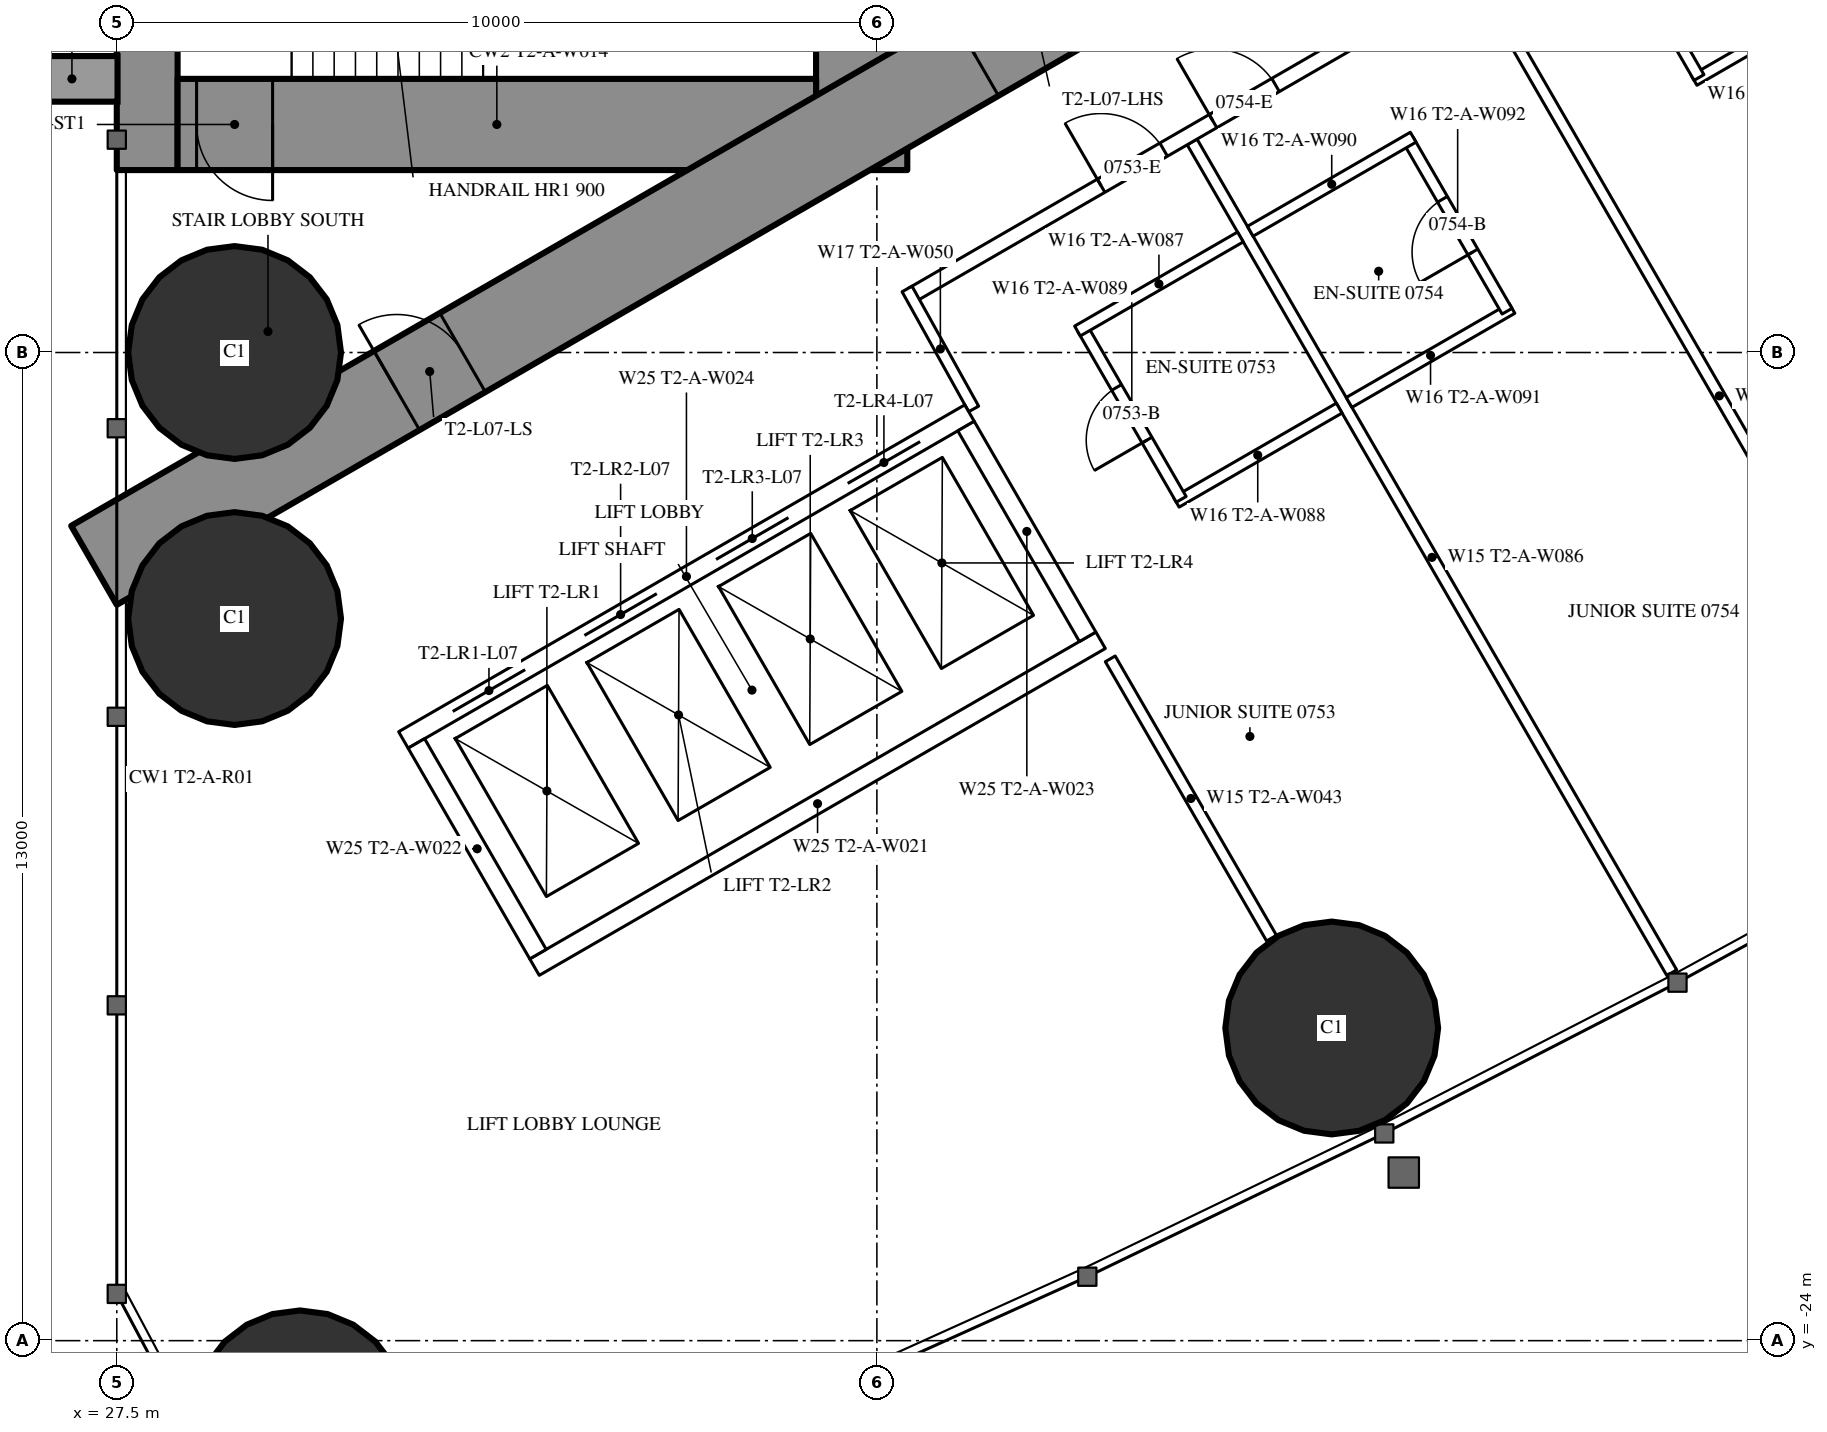
"""IFC4 building model, lengths in metres.
Left out: names, types, materials, properties, quantities, classifications, styles, units other than length and angle.
Written with IfcOpenShell. Run it as: python <this file> out.ifc"""

import sys

from ifc_helpers import new_model, si_unit, direction, frame, frame_2d, origin, origin_2d, place, context, subcontext, project, spatial, rectangle, hollow_circle, extrude, element, fill, save


model = new_model("IFC4")
c1 = context("Model", 3, precision=1e-05, world=origin(), true_north=direction((0.0, 1.0)))
c2 = subcontext(c1, "Body", "Model", "MODEL_VIEW")
j1 = project(units=[si_unit("LENGTHUNIT", "METRE"), si_unit("PLANEANGLEUNIT", "RADIAN")], contexts=[c1])
p1 = place(None, origin())
s1 = spatial("IfcSite", under=j1, at=p1, CompositionType="ELEMENT")
p2 = place(p1, origin())
s2 = spatial("IfcBuilding", under=s1, at=p2, CompositionType="ELEMENT")
p3 = place(p2, frame((0.0, 0.0, 32.0)))
s3 = spatial("IfcBuildingStorey", under=s2, at=p3, CompositionType="ELEMENT", Elevation=32.0)
for number, where, z_axis, x_axis in (
    (1, (29.911, -25.002, 0.0), (0.0, 0.0, 1.0), (1.0, 0.0, 0.0)),
    (2, (29.05, -11.0, 0.0), (0.0, 0.0, 1.0), (1.0, 0.0, 0.0)),
    (3, (29.05, -14.5, 0.0), (0.0, 0.0, 1.0), (1.0, 0.0, 0.0)),
    (4, (43.484, -19.886, 0.0), (0.0, 0.0, 1.0), (1.0, 0.0, 0.0)),
):
    element("IfcColumn", number, at=place(p3, frame(where, z_axis=z_axis, x_axis=x_axis)), inside=s3, PredefinedType="COLUMN", context=c2, shape_type="SweptSolid", body=[
        extrude(hollow_circle(Radius=1.4, WallThickness=0.12, at=origin_2d()), origin(), (0.0, 0.0, 1.0), 3.5),
    ])
p4 = place(p3, frame((27.9, -8.6, 0.0), z_axis=(0.0, 0.0, 1.0), x_axis=(0.0, 1.0, 0.0)))
e5 = element("IfcWall", 5, at=p4, inside=s3, PredefinedType="SHEAR", context=c2, shape_type="SweptSolid", body=[
    extrude(rectangle(XDim=17.2, YDim=0.8, at=frame_2d((8.6, 0.0))), origin(), (0.0, 0.0, 1.0), 3.5),
])
p5 = place(p4, frame((2.45, 0.0, 0.6)))
e6 = element("IfcOpeningElement", 6, at=p5, cuts=e5, PredefinedType="OPENING", context=c2, shape_type="SweptSolid", body=[
    extrude(rectangle(XDim=0.6, YDim=2.1, at=frame_2d((0.3, 1.05))), frame((0.0, 0.41, 0.0), z_axis=(0.0, -1.0, 0.0), x_axis=(1.0, 0.0, 0.0)), (0.0, 0.0, 1.0), 0.82),
])
p6 = place(p4, frame((14.15, 0.0, 0.6)))
e7 = element("IfcOpeningElement", 7, at=p6, cuts=e5, PredefinedType="OPENING", context=c2, shape_type="SweptSolid", body=[
    extrude(rectangle(XDim=0.6, YDim=2.1, at=frame_2d((0.3, 1.05))), frame((0.0, 0.41, 0.0), z_axis=(0.0, -1.0, 0.0), x_axis=(1.0, 0.0, 0.0)), (0.0, 0.0, 1.0), 0.82),
])
p7 = place(p3, frame((37.3, -8.6, 0.0), z_axis=(0.0, 0.0, 1.0), x_axis=(0.0, 1.0, 0.0)))
e8 = element("IfcWall", 8, at=p7, inside=s3, PredefinedType="SHEAR", context=c2, shape_type="SweptSolid", body=[
    extrude(rectangle(XDim=17.2, YDim=1.2, at=frame_2d((8.6, 0.0))), origin(), (0.0, 0.0, 1.0), 3.5),
])
p8 = place(p7, frame((7.7, 0.0, 0.0)))
e9 = element("IfcOpeningElement", 9, at=p8, cuts=e8, PredefinedType="OPENING", context=c2, shape_type="SweptSolid", body=[
    extrude(rectangle(XDim=1.8, YDim=2.2, at=frame_2d((0.9, 1.1))), frame((0.0, 0.61, 0.0), z_axis=(0.0, -1.0, 0.0), x_axis=(1.0, 0.0, 0.0)), (0.0, 0.0, 1.0), 1.22),
])
p9 = place(p3, frame((28.3, -8.0, 0.0), z_axis=(0.0, 0.0, 1.0), x_axis=(1.0, 0.0, 0.0)))
e10 = element("IfcWall", 10, at=p9, inside=s3, PredefinedType="SHEAR", context=c2, shape_type="SweptSolid", body=[
    extrude(rectangle(XDim=8.4, YDim=1.2, at=frame_2d((4.2, 0.0))), origin(), (0.0, 0.0, 1.0), 3.5),
])
p10 = place(p9, frame((0.25, 0.0, 0.0)))
e11 = element("IfcOpeningElement", 11, at=p10, cuts=e10, PredefinedType="OPENING", context=c2, shape_type="SweptSolid", body=[
    extrude(rectangle(XDim=1.0, YDim=2.2, at=frame_2d((0.5, 1.1))), frame((0.0, 0.61, 0.0), z_axis=(0.0, -1.0, 0.0), x_axis=(1.0, 0.0, 0.0)), (0.0, 0.0, 1.0), 1.22),
])
p11 = place(p3, frame((27.2, -13.8, 0.0), z_axis=(0.0, 0.0, 1.0), x_axis=(0.866027159892, 0.499996958321, 0.0)))
e12 = element("IfcWall", 12, at=p11, inside=s3, PredefinedType="SHEAR", context=c2, shape_type="SweptSolid", body=[
    extrude(rectangle(XDim=27.947, YDim=1.2, at=frame_2d((13.973, 0.0))), origin(), (0.0, 0.0, 1.0), 3.5),
])
p12 = place(p11, frame((4.6, 0.0, 0.0)))
e13 = element("IfcOpeningElement", 13, at=p12, cuts=e12, PredefinedType="OPENING", context=c2, shape_type="SweptSolid", body=[
    extrude(rectangle(XDim=1.0, YDim=2.2, at=frame_2d((0.5, 1.1))), frame((0.0, 0.61, 0.0), z_axis=(0.0, -1.0, 0.0), x_axis=(1.0, 0.0, 0.0)), (0.0, 0.0, 1.0), 1.22),
])
p13 = place(p11, frame((13.395, 0.0, 0.0)))
e14 = element("IfcOpeningElement", 14, at=p13, cuts=e12, PredefinedType="OPENING", context=c2, shape_type="SweptSolid", body=[
    extrude(rectangle(XDim=1.8, YDim=2.2, at=frame_2d((0.9, 1.1))), frame((0.0, 0.61, 0.0), z_axis=(0.0, -1.0, 0.0), x_axis=(1.0, 0.0, 0.0)), (0.0, 0.0, 1.0), 1.22),
])
p14 = place(p3, frame((41.647, -8.23, 0.0), z_axis=(0.0, 0.0, 1.0), x_axis=(0.49998590462, -0.866033541603, 0.0)))
e15 = element("IfcWall", 15, at=p14, inside=s3, PredefinedType="PARTITIONING", context=c2, shape_type="SweptSolid", body=[
    extrude(rectangle(XDim=12.621, YDim=0.15, at=frame_2d((6.311, 0.0))), origin(), (0.0, 0.0, 1.0), 3.25),
])
p15 = place(p3, frame((45.403, -6.062, 0.0), z_axis=(0.0, 0.0, 1.0), x_axis=(0.500007077968, -0.866021317279, 0.0)))
e16 = element("IfcWall", 16, at=p15, inside=s3, PredefinedType="PARTITIONING", context=c2, shape_type="SweptSolid", body=[
    extrude(rectangle(XDim=12.721, YDim=0.15, at=frame_2d((6.361, 0.0))), origin(), (0.0, 0.0, 1.0), 3.25),
])
p16 = place(p3, frame((40.57, -15.03, 0.0), z_axis=(0.0, 0.0, 1.0), x_axis=(0.500012993597, -0.866017901798, 0.0)))
e17 = element("IfcWall", 17, at=p16, inside=s3, PredefinedType="PARTITIONING", context=c2, shape_type="SweptSolid", body=[
    extrude(rectangle(XDim=4.243, YDim=0.15, at=frame_2d((2.122, 0.0))), origin(), (0.0, 0.0, 1.0), 3.25),
])
p17 = place(p3, frame((37.96, -10.243, 0.0), z_axis=(0.0, 0.0, 1.0), x_axis=(0.866026429433, 0.499998223521, 0.0)))
e18 = element("IfcWall", 18, at=p17, inside=s3, PredefinedType="PARTITIONING", context=c2, shape_type="SweptSolid", body=[
    extrude(rectangle(XDim=20.487, YDim=0.2, at=frame_2d((10.243, 0.0))), origin(), (0.0, 0.0, 1.0), 3.25),
])
p18 = place(p17, frame((4.575, 0.0, 0.0)))
e19 = element("IfcOpeningElement", 19, at=p18, cuts=e18, PredefinedType="OPENING", context=c2, shape_type="SweptSolid", body=[
    extrude(rectangle(XDim=0.95, YDim=2.2, at=frame_2d((0.475, 1.1))), frame((0.0, 0.11, 0.0), z_axis=(0.0, -1.0, 0.0), x_axis=(1.0, 0.0, 0.0)), (0.0, 0.0, 1.0), 0.22),
])
p19 = place(p17, frame((9.199, 0.0, 0.0)))
e20 = element("IfcOpeningElement", 20, at=p19, cuts=e18, PredefinedType="OPENING", context=c2, shape_type="SweptSolid", body=[
    extrude(rectangle(XDim=0.95, YDim=2.2, at=frame_2d((0.475, 1.1))), frame((0.0, 0.11, 0.0), z_axis=(0.0, -1.0, 0.0), x_axis=(1.0, 0.0, 0.0)), (0.0, 0.0, 1.0), 0.22),
])
p20 = place(p17, frame((15.599, 0.0, 0.0)))
e21 = element("IfcOpeningElement", 21, at=p20, cuts=e18, PredefinedType="OPENING", context=c2, shape_type="SweptSolid", body=[
    extrude(rectangle(XDim=0.95, YDim=2.2, at=frame_2d((0.475, 1.1))), frame((0.0, 0.11, 0.0), z_axis=(0.0, -1.0, 0.0), x_axis=(1.0, 0.0, 0.0)), (0.0, 0.0, 1.0), 0.22),
])
p21 = place(p17, frame((2.875, 0.0, 0.0)))
e22 = element("IfcOpeningElement", 22, at=p21, cuts=e18, PredefinedType="OPENING", context=c2, shape_type="SweptSolid", body=[
    extrude(rectangle(XDim=0.95, YDim=2.2, at=frame_2d((0.475, 1.1))), frame((0.0, 0.11, 0.0), z_axis=(0.0, -1.0, 0.0), x_axis=(1.0, 0.0, 0.0)), (0.0, 0.0, 1.0), 0.22),
])
p22 = place(p3, frame((38.773, -11.742, 0.0), z_axis=(0.0, 0.0, 1.0), x_axis=(-0.485528096672, 0.8742210632, 0.0)))
e23 = element("IfcWall", 23, at=p22, inside=s3, PredefinedType="PARTITIONING", context=c2, shape_type="SweptSolid", body=[
    extrude(rectangle(XDim=1.805, YDim=0.15, at=frame_2d((0.903, 0.0))), origin(), (0.0, 0.0, 1.0), 3.25),
])
p23 = place(p3, frame((43.712, -11.657, 0.0), z_axis=(0.0, 0.0, 1.0), x_axis=(0.866006523861, 0.500032699561, 0.0)))
e24 = element("IfcWall", 24, at=p23, inside=s3, PredefinedType="PARTITIONING", context=c2, shape_type="SweptSolid", body=[
    extrude(rectangle(XDim=2.475, YDim=0.15, at=frame_2d((1.237, 0.0))), origin(), (0.0, 0.0, 1.0), 3.25),
])
p24 = place(p3, frame((44.491, -8.205, 0.0), z_axis=(0.0, 0.0, 1.0), x_axis=(0.500047596559, -0.865997922154, 0.0)))
e25 = element("IfcWall", 25, at=p24, inside=s3, PredefinedType="PARTITIONING", context=c2, shape_type="SweptSolid", body=[
    extrude(rectangle(XDim=2.6, YDim=0.15, at=frame_2d((1.3, 0.0))), origin(), (0.0, 0.0, 1.0), 3.25),
])
p25 = place(p24, frame((0.9, 0.0, 0.0)))
e26 = element("IfcOpeningElement", 26, at=p25, cuts=e25, PredefinedType="OPENING", context=c2, shape_type="SweptSolid", body=[
    extrude(rectangle(XDim=0.8, YDim=2.2, at=frame_2d((0.4, 1.1))), frame((0.0, 0.085, 0.0), z_axis=(0.0, -1.0, 0.0), x_axis=(1.0, 0.0, 0.0)), (0.0, 0.0, 1.0), 0.17),
])
for number, where, z_axis, x_axis in (
    (27, (42.412, -9.405, 0.0), (0.0, 0.0, 1.0), (0.866, 0.5, 0.0)),
    (28, (48.251, -7.42, 0.0), (0.0, 0.0, 1.0), (0.866, 0.5, 0.0)),
):
    element("IfcWall", number, at=place(p3, frame(where, z_axis=z_axis, x_axis=x_axis)), inside=s3, PredefinedType="PARTITIONING", context=c2, shape_type="SweptSolid", body=[
        extrude(rectangle(XDim=2.475, YDim=0.15, at=frame_2d((1.237, 0.0))), origin(), (0.0, 0.0, 1.0), 3.25),
    ])
p26 = place(p3, frame((47.016, -5.13, 0.0), z_axis=(0.0, 0.0, 1.0), x_axis=(0.500006934395, -0.866021400173, 0.0)))
e29 = element("IfcWall", 29, at=p26, inside=s3, PredefinedType="PARTITIONING", context=c2, shape_type="SweptSolid", body=[
    extrude(rectangle(XDim=2.6, YDim=0.15, at=frame_2d((1.3, 0.0))), origin(), (0.0, 0.0, 1.0), 3.25),
])
p27 = place(p26, frame((0.9, 0.0, 0.0)))
e30 = element("IfcOpeningElement", 30, at=p27, cuts=e29, PredefinedType="OPENING", context=c2, shape_type="SweptSolid", body=[
    extrude(rectangle(XDim=0.8, YDim=2.2, at=frame_2d((0.4, 1.1))), frame((0.0, 0.085, 0.0), z_axis=(0.0, -1.0, 0.0), x_axis=(1.0, 0.0, 0.0)), (0.0, 0.0, 1.0), 0.17),
])
p28 = place(p3, frame((41.439, -12.969, 0.0), z_axis=(0.0, 0.0, 1.0), x_axis=(0.866031185235, 0.4999899861, 0.0)))
e31 = element("IfcWall", 31, at=p28, inside=s3, PredefinedType="PARTITIONING", context=c2, shape_type="SweptSolid", body=[
    extrude(rectangle(XDim=2.475, YDim=0.15, at=frame_2d((1.238, 0.0))), origin(), (0.0, 0.0, 1.0), 3.25),
])
p29 = place(p3, frame((40.204, -10.68, 0.0), z_axis=(0.0, 0.0, 1.0), x_axis=(0.500006934395, -0.866021400173, 0.0)))
e32 = element("IfcWall", 32, at=p29, inside=s3, PredefinedType="PARTITIONING", context=c2, shape_type="SweptSolid", body=[
    extrude(rectangle(XDim=2.6, YDim=0.15, at=frame_2d((1.3, 0.0))), origin(), (0.0, 0.0, 1.0), 3.25),
])
p30 = place(p29, frame((0.9, 0.0, 0.0)))
e33 = element("IfcOpeningElement", 33, at=p30, cuts=e32, PredefinedType="OPENING", context=c2, shape_type="SweptSolid", body=[
    extrude(rectangle(XDim=0.8, YDim=2.2, at=frame_2d((0.4, 1.1))), frame((0.0, 0.085, 0.0), z_axis=(0.0, -1.0, 0.0), x_axis=(1.0, 0.0, 0.0)), (0.0, 0.0, 1.0), 0.17),
])
p31 = place(p3, frame((40.139, -10.718, 0.0), z_axis=(0.0, 0.0, 1.0), x_axis=(0.866031185235, 0.4999899861, 0.0)))
e34 = element("IfcWall", 34, at=p31, inside=s3, PredefinedType="PARTITIONING", context=c2, shape_type="SweptSolid", body=[
    extrude(rectangle(XDim=2.475, YDim=0.15, at=frame_2d((1.238, 0.0))), origin(), (0.0, 0.0, 1.0), 3.25),
])
p32 = place(p3, frame((31.271, -16.097, 0.0), z_axis=(0.0, 0.0, 1.0), x_axis=(0.86604045752, 0.499973925258, 0.0)))
e35 = element("IfcWall", 35, at=p32, inside=s3, PredefinedType="PARTITIONING", context=c2, shape_type="SweptSolid", body=[
    extrude(rectangle(XDim=8.6, YDim=0.25, at=frame_2d((4.3, 0.0))), origin(), (0.0, 0.0, 1.0), 3.25),
])
p33 = place(p32, frame((0.75, 0.0, 0.0)))
e36 = element("IfcOpeningElement", 36, at=p33, cuts=e35, PredefinedType="OPENING", context=c2, shape_type="SweptSolid", body=[
    extrude(rectangle(XDim=1.1, YDim=2.2, at=frame_2d((0.55, 1.1))), frame((0.0, 0.135, 0.0), z_axis=(0.0, -1.0, 0.0), x_axis=(1.0, 0.0, 0.0)), (0.0, 0.0, 1.0), 0.27),
])
p34 = place(p32, frame((2.75, 0.0, 0.0)))
e37 = element("IfcOpeningElement", 37, at=p34, cuts=e35, PredefinedType="OPENING", context=c2, shape_type="SweptSolid", body=[
    extrude(rectangle(XDim=1.1, YDim=2.2, at=frame_2d((0.55, 1.1))), frame((0.0, 0.135, 0.0), z_axis=(0.0, -1.0, 0.0), x_axis=(1.0, 0.0, 0.0)), (0.0, 0.0, 1.0), 0.27),
])
p35 = place(p32, frame((4.75, 0.0, 0.0)))
e38 = element("IfcOpeningElement", 38, at=p35, cuts=e35, PredefinedType="OPENING", context=c2, shape_type="SweptSolid", body=[
    extrude(rectangle(XDim=1.1, YDim=2.2, at=frame_2d((0.55, 1.1))), frame((0.0, 0.135, 0.0), z_axis=(0.0, -1.0, 0.0), x_axis=(1.0, 0.0, 0.0)), (0.0, 0.0, 1.0), 0.27),
])
p36 = place(p32, frame((6.75, 0.0, 0.0)))
e39 = element("IfcOpeningElement", 39, at=p36, cuts=e35, PredefinedType="OPENING", context=c2, shape_type="SweptSolid", body=[
    extrude(rectangle(XDim=1.1, YDim=2.2, at=frame_2d((0.55, 1.1))), frame((0.0, 0.135, 0.0), z_axis=(0.0, -1.0, 0.0), x_axis=(1.0, 0.0, 0.0)), (0.0, 0.0, 1.0), 0.27),
])
p37 = place(p3, frame((32.996, -19.086, 0.0), z_axis=(0.0, 0.0, 1.0), x_axis=(0.866028165386, 0.499995216735, 0.0)))
e40 = element("IfcWall", 40, at=p37, inside=s3, PredefinedType="PARTITIONING", context=c2, shape_type="SweptSolid", body=[
    extrude(rectangle(XDim=8.6, YDim=0.25, at=frame_2d((4.3, 0.0))), origin(), (0.0, 0.0, 1.0), 3.25),
])
for number, where, z_axis, x_axis in (
    (41, (31.441, -16.143, 0.0), (0.0, 0.0, 1.0), (0.5, -0.866, 0.0)),
    (42, (38.673, -11.968, 0.0), (0.0, 0.0, 1.0), (0.5, -0.866, 0.0)),
):
    element("IfcWall", number, at=place(p3, frame(where, z_axis=z_axis, x_axis=x_axis)), inside=s3, PredefinedType="PARTITIONING", context=c2, shape_type="SweptSolid", body=[
        extrude(rectangle(XDim=3.201, YDim=0.25, at=frame_2d((1.6, 0.0))), origin(), (0.0, 0.0, 1.0), 3.25),
    ])
p38 = place(p25, origin())
e43 = element("IfcDoor", 43, at=p38, inside=s3, OperationType="SINGLE_SWING_RIGHT", PredefinedType="DOOR", context=c2, shape_type="SweptSolid", body=[
    extrude(rectangle(XDim=0.8, YDim=2.2, at=frame_2d((0.4, 1.1))), frame((0.0, 0.025, 0.0), z_axis=(0.0, -1.0, 0.0), x_axis=(1.0, 0.0, 0.0)), (0.0, 0.0, 1.0), 0.05),
])
fill(e26, e43)
p39 = place(p18, origin())
e44 = element("IfcDoor", 44, at=p39, inside=s3, OperationType="SINGLE_SWING_LEFT", PredefinedType="DOOR", context=c2, shape_type="SweptSolid", body=[
    extrude(rectangle(XDim=0.95, YDim=2.2, at=frame_2d((0.475, 1.1))), frame((0.0, 0.025, 0.0), z_axis=(0.0, -1.0, 0.0), x_axis=(1.0, 0.0, 0.0)), (0.0, 0.0, 1.0), 0.05),
])
fill(e19, e44)
p40 = place(p30, origin())
e45 = element("IfcDoor", 45, at=p40, inside=s3, OperationType="SINGLE_SWING_RIGHT", PredefinedType="DOOR", context=c2, shape_type="SweptSolid", body=[
    extrude(rectangle(XDim=0.8, YDim=2.2, at=frame_2d((0.4, 1.1))), frame((0.0, 0.025, 0.0), z_axis=(0.0, -1.0, 0.0), x_axis=(1.0, 0.0, 0.0)), (0.0, 0.0, 1.0), 0.05),
])
fill(e33, e45)
p41 = place(p21, origin())
e46 = element("IfcDoor", 46, at=p41, inside=s3, OperationType="SINGLE_SWING_LEFT", PredefinedType="DOOR", context=c2, shape_type="SweptSolid", body=[
    extrude(rectangle(XDim=0.95, YDim=2.2, at=frame_2d((0.475, 1.1))), frame((0.0, 0.025, 0.0), z_axis=(0.0, -1.0, 0.0), x_axis=(1.0, 0.0, 0.0)), (0.0, 0.0, 1.0), 0.05),
])
fill(e22, e46)
p42 = place(p12, origin())
e47 = element("IfcDoor", 47, at=p42, inside=s3, OperationType="SINGLE_SWING_LEFT", PredefinedType="DOOR", context=c2, shape_type="SweptSolid", body=[
    extrude(rectangle(XDim=1.0, YDim=2.2, at=frame_2d((0.5, 1.1))), frame((0.0, 0.025, 0.0), z_axis=(0.0, -1.0, 0.0), x_axis=(1.0, 0.0, 0.0)), (0.0, 0.0, 1.0), 0.05),
])
fill(e13, e47)
p43 = place(p13, origin())
e48 = element("IfcDoor", 48, at=p43, inside=s3, OperationType="DOUBLE_DOOR_SINGLE_SWING", PredefinedType="DOOR", context=c2, shape_type="SweptSolid", body=[
    extrude(rectangle(XDim=1.8, YDim=2.2, at=frame_2d((0.9, 1.1))), frame((0.0, 0.025, 0.0), z_axis=(0.0, -1.0, 0.0), x_axis=(1.0, 0.0, 0.0)), (0.0, 0.0, 1.0), 0.05),
])
fill(e14, e48)
p44 = place(p10, origin())
e49 = element("IfcDoor", 49, at=p44, inside=s3, OperationType="SINGLE_SWING_RIGHT", PredefinedType="DOOR", context=c2, shape_type="SweptSolid", body=[
    extrude(rectangle(XDim=1.0, YDim=2.2, at=frame_2d((0.5, 1.1))), frame((0.0, 0.025, 0.0), z_axis=(0.0, -1.0, 0.0), x_axis=(1.0, 0.0, 0.0)), (0.0, 0.0, 1.0), 0.05),
])
fill(e11, e49)
p45 = place(p33, origin())
e50 = element("IfcDoor", 50, at=p45, inside=s3, OperationType="DOUBLE_DOOR_SLIDING", PredefinedType="USERDEFINED", context=c2, shape_type="SweptSolid", body=[
    extrude(rectangle(XDim=1.1, YDim=2.2, at=frame_2d((0.55, 1.1))), frame((0.0, 0.025, 0.0), z_axis=(0.0, -1.0, 0.0), x_axis=(1.0, 0.0, 0.0)), (0.0, 0.0, 1.0), 0.05),
])
fill(e36, e50)
p46 = place(p34, origin())
e51 = element("IfcDoor", 51, at=p46, inside=s3, OperationType="DOUBLE_DOOR_SLIDING", PredefinedType="USERDEFINED", context=c2, shape_type="SweptSolid", body=[
    extrude(rectangle(XDim=1.1, YDim=2.2, at=frame_2d((0.55, 1.1))), frame((0.0, 0.025, 0.0), z_axis=(0.0, -1.0, 0.0), x_axis=(1.0, 0.0, 0.0)), (0.0, 0.0, 1.0), 0.05),
])
fill(e37, e51)
p47 = place(p35, origin())
e52 = element("IfcDoor", 52, at=p47, inside=s3, OperationType="DOUBLE_DOOR_SLIDING", PredefinedType="USERDEFINED", context=c2, shape_type="SweptSolid", body=[
    extrude(rectangle(XDim=1.1, YDim=2.2, at=frame_2d((0.55, 1.1))), frame((0.0, 0.025, 0.0), z_axis=(0.0, -1.0, 0.0), x_axis=(1.0, 0.0, 0.0)), (0.0, 0.0, 1.0), 0.05),
])
fill(e38, e52)
p48 = place(p36, origin())
e53 = element("IfcDoor", 53, at=p48, inside=s3, OperationType="DOUBLE_DOOR_SLIDING", PredefinedType="USERDEFINED", context=c2, shape_type="SweptSolid", body=[
    extrude(rectangle(XDim=1.1, YDim=2.2, at=frame_2d((0.55, 1.1))), frame((0.0, 0.025, 0.0), z_axis=(0.0, -1.0, 0.0), x_axis=(1.0, 0.0, 0.0)), (0.0, 0.0, 1.0), 0.05),
])
fill(e39, e53)
save(model, sys.argv[1])
